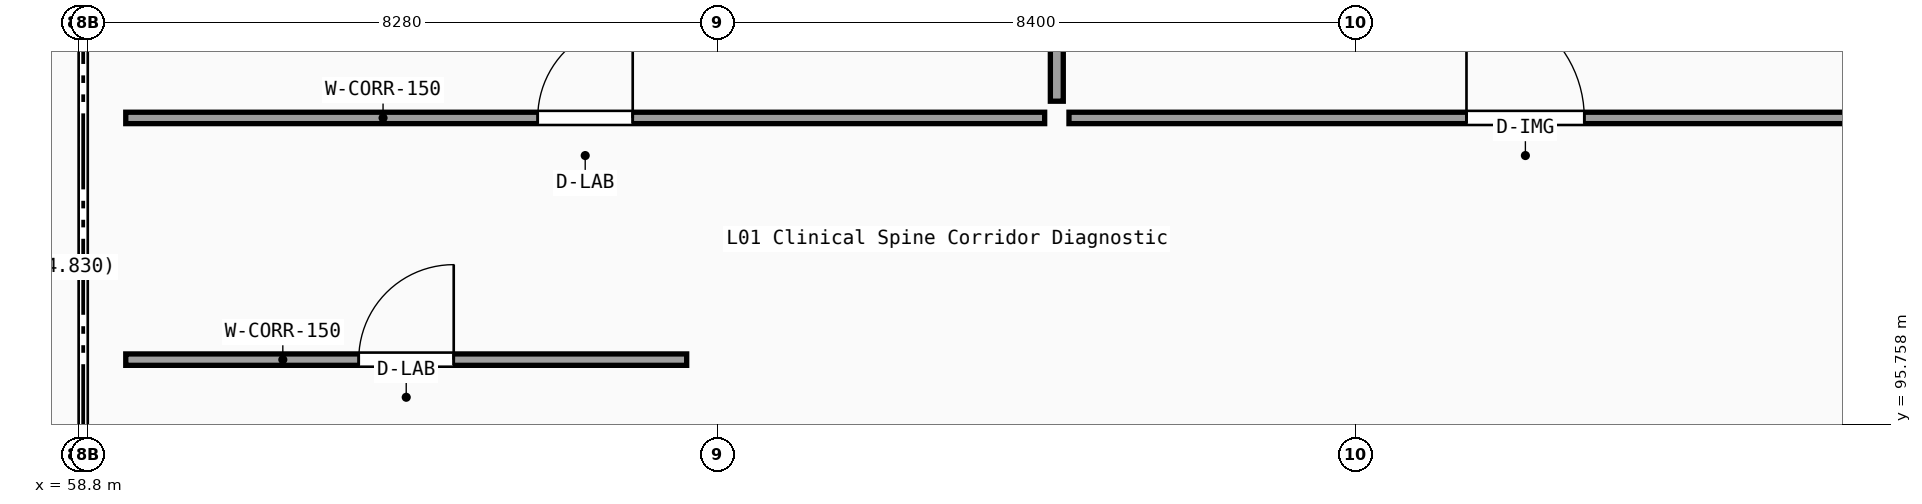
"""IFC4 building model, lengths in metres.
Left out: names, types, materials, properties, quantities, classifications, styles, units other than length and angle.
Written with IfcOpenShell. Run it as: python <this file> out.ifc"""

import sys

from ifc_helpers import new_model, si_unit, direction, frame, frame_2d, origin, place, context, subcontext, project, spatial, rectangle, extrude, element, fill, save


model = new_model("IFC4")
c1 = context("Model", 3, precision=1e-05, world=origin(), true_north=direction((0.0, 1.0)))
c2 = subcontext(c1, "Body", "Model", "MODEL_VIEW")
j1 = project(units=[si_unit("LENGTHUNIT", "METRE"), si_unit("PLANEANGLEUNIT", "RADIAN")], contexts=[c1])
p1 = place(None, origin())
s1 = spatial("IfcSite", under=j1, at=p1, CompositionType="ELEMENT")
p2 = place(p1, origin())
s2 = spatial("IfcBuilding", under=s1, at=p2, CompositionType="ELEMENT")
p3 = place(p2, frame((0.0, 0.0, 5.1)))
s3 = spatial("IfcBuildingStorey", under=s2, at=p3, CompositionType="ELEMENT", Elevation=5.1)
p4 = place(p3, frame((59.42, 96.61, 0.0), z_axis=(0.0, 0.0, 1.0), x_axis=(1.0, 0.0, 0.0)))
e1 = element("IfcWall", 1, at=p4, inside=s3, PredefinedType="PARTITIONING", context=c2, shape_type="SweptSolid", body=[
    extrude(rectangle(XDim=7.38, YDim=0.15, at=frame_2d((3.69, 0.0))), origin(), (0.0, 0.0, 1.0), 4.82),
])
p5 = place(p4, frame((3.065, 0.0, 0.0)))
e2 = element("IfcOpeningElement", 2, at=p5, cuts=e1, PredefinedType="OPENING", context=c2, shape_type="SweptSolid", body=[
    extrude(rectangle(XDim=1.25, YDim=2.2, at=frame_2d((0.625, 1.1))), frame((0.0, 0.085, 0.0), z_axis=(0.0, -1.0, 0.0), x_axis=(1.0, 0.0, 0.0)), (0.0, 0.0, 1.0), 0.17),
])
p6 = place(p3, frame((59.42, 99.79, 0.0), z_axis=(0.0, 0.0, 1.0), x_axis=(1.0, 0.0, 0.0)))
e3 = element("IfcWall", 3, at=p6, inside=s3, PredefinedType="PARTITIONING", context=c2, shape_type="SweptSolid", body=[
    extrude(rectangle(XDim=12.09, YDim=0.15, at=frame_2d((6.045, 0.0))), origin(), (0.0, 0.0, 1.0), 4.43),
])
p7 = place(p6, frame((5.42, 0.0, 0.0)))
e4 = element("IfcOpeningElement", 4, at=p7, cuts=e3, PredefinedType="OPENING", context=c2, shape_type="SweptSolid", body=[
    extrude(rectangle(XDim=1.25, YDim=2.2, at=frame_2d((0.625, 1.1))), frame((0.0, 0.085, 0.0), z_axis=(0.0, -1.0, 0.0), x_axis=(1.0, 0.0, 0.0)), (0.0, 0.0, 1.0), 0.17),
])
p8 = place(p3, frame((71.67, 100.01, 0.0), z_axis=(0.0, 0.0, 1.0), x_axis=(0.0, 1.0, 0.0)))
e5 = element("IfcWall", 5, at=p8, inside=s3, PredefinedType="PARTITIONING", context=c2, shape_type="SweptSolid", body=[
    extrude(rectangle(XDim=16.1, YDim=0.17, at=frame_2d((8.05, 0.0))), origin(), (0.0, 0.0, 1.0), 4.24),
])
p9 = place(p3, frame((71.83, 99.79, 0.0), z_axis=(0.0, 0.0, 1.0), x_axis=(1.0, 0.0, 0.0)))
e6 = element("IfcWall", 6, at=p9, inside=s3, PredefinedType="PARTITIONING", context=c2, shape_type="SweptSolid", body=[
    extrude(rectangle(XDim=12.01, YDim=0.15, at=frame_2d((6.005, 0.0))), origin(), (0.0, 0.0, 1.0), 4.43),
])
p10 = place(p9, frame((5.23, 0.0, 0.0)))
e7 = element("IfcOpeningElement", 7, at=p10, cuts=e6, PredefinedType="OPENING", context=c2, shape_type="SweptSolid", body=[
    extrude(rectangle(XDim=1.55, YDim=2.25, at=frame_2d((0.775, 1.125))), frame((0.0, 0.085, 0.0), z_axis=(0.0, -1.0, 0.0), x_axis=(1.0, 0.0, 0.0)), (0.0, 0.0, 1.0), 0.17),
])
p11 = place(p5, origin())
e8 = element("IfcDoor", 8, at=p11, inside=s3, OperationType="SINGLE_SWING_RIGHT", PredefinedType="DOOR", context=c2, shape_type="SweptSolid", body=[
    extrude(rectangle(XDim=1.25, YDim=2.2, at=frame_2d((0.625, 1.1))), frame((0.0, 0.025, 0.0), z_axis=(0.0, -1.0, 0.0), x_axis=(1.0, 0.0, 0.0)), (0.0, 0.0, 1.0), 0.05),
])
fill(e2, e8)
p12 = place(p7, origin())
e9 = element("IfcDoor", 9, at=p12, inside=s3, OperationType="SINGLE_SWING_RIGHT", PredefinedType="DOOR", context=c2, shape_type="SweptSolid", body=[
    extrude(rectangle(XDim=1.25, YDim=2.2, at=frame_2d((0.625, 1.1))), frame((0.0, 0.025, 0.0), z_axis=(0.0, -1.0, 0.0), x_axis=(1.0, 0.0, 0.0)), (0.0, 0.0, 1.0), 0.05),
])
fill(e4, e9)
p13 = place(p10, origin())
e10 = element("IfcDoor", 10, at=p13, inside=s3, OperationType="SINGLE_SWING_LEFT", PredefinedType="DOOR", context=c2, shape_type="SweptSolid", body=[
    extrude(rectangle(XDim=1.55, YDim=2.25, at=frame_2d((0.775, 1.125))), frame((0.0, 0.025, 0.0), z_axis=(0.0, -1.0, 0.0), x_axis=(1.0, 0.0, 0.0)), (0.0, 0.0, 1.0), 0.05),
])
fill(e7, e10)
save(model, sys.argv[1])
